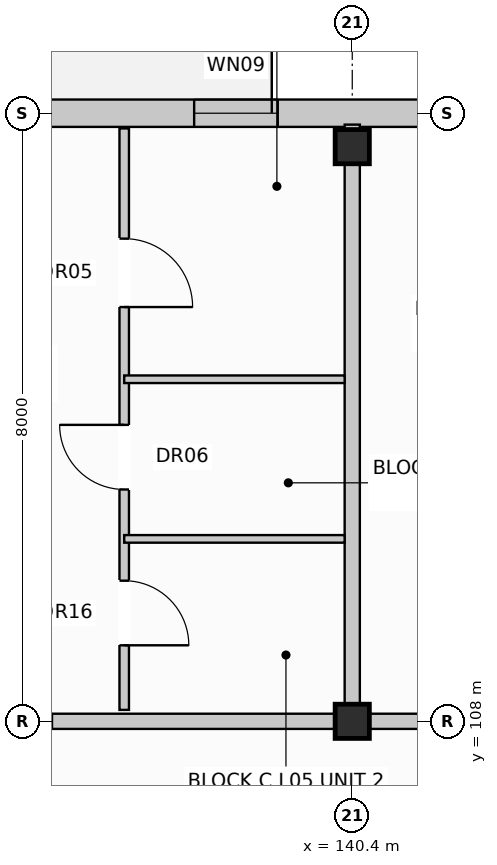
"""IFC4 building model, lengths in metres.
Left out: names, types, materials, properties, quantities, classifications, styles, units other than length and angle.
Written with IfcOpenShell. Run it as: python <this file> out.ifc"""

import sys

from ifc_helpers import new_model, si_unit, direction, frame, frame_2d, origin, origin_with_axes, origin_2d, place, context, subcontext, project, spatial, rectangle, extrude, element, fill, save


model = new_model("IFC4")
c1 = context("Model", 3, precision=1e-05, world=origin(), true_north=direction((0.0, 1.0)))
c2 = subcontext(c1, "Body", "Model", "MODEL_VIEW")
j1 = project(units=[si_unit("LENGTHUNIT", "METRE"), si_unit("PLANEANGLEUNIT", "RADIAN")], contexts=[c1])
p1 = place(None, origin())
s1 = spatial("IfcSite", under=j1, at=p1, CompositionType="ELEMENT")
p2 = place(p1, origin())
s2 = spatial("IfcBuilding", under=s1, at=p2, CompositionType="ELEMENT")
p3 = place(p2, frame((0.0, 0.0, 17.6)))
s3 = spatial("IfcBuildingStorey", under=s2, at=p3, CompositionType="ELEMENT", Elevation=17.6)
for number, where, z_axis, x_axis in (
    (1, (140.4, 108.0, 0.0), (0.0, 0.0, 1.0), (1.0, 0.0, 0.0)),
    (2, (140.4, 115.56, 0.0), (0.0, 0.0, 1.0), (1.0, 0.0, 0.0)),
):
    element("IfcColumn", number, at=place(p3, frame(where, z_axis=z_axis, x_axis=x_axis)), inside=s3, PredefinedType="COLUMN", context=c2, shape_type="SweptSolid", body=[
        extrude(rectangle(XDim=0.45, YDim=0.45, at=origin_2d()), origin(), (0.0, 0.0, 1.0), 3.2),
    ])
p4 = place(p3, frame((112.97, 116.0, 0.0), z_axis=(0.0, 0.0, 1.0), x_axis=(1.0, 0.0, 0.0)))
e3 = element("IfcWall", 3, at=p4, inside=s3, PredefinedType="STANDARD", context=c2, shape_type="SweptSolid", body=[
    extrude(rectangle(XDim=54.86, YDim=0.36, at=frame_2d((27.43, 0.0))), origin(), (0.0, 0.0, 1.0), 2.95),
])
p5 = place(p4, frame((4.891, 0.0, 0.0)))
e4 = element("IfcOpeningElement", 4, at=p5, cuts=e3, PredefinedType="OPENING", context=c2, shape_type="SweptSolid", body=[
    extrude(rectangle(XDim=0.95, YDim=2.1, at=frame_2d((0.475, 1.05))), frame((0.0, 0.192, 0.0), z_axis=(0.0, -1.0, 0.0), x_axis=(1.0, 0.0, 0.0)), (0.0, 0.0, 1.0), 0.384),
])
p6 = place(p4, frame((15.309, 0.0, 0.0)))
e5 = element("IfcOpeningElement", 5, at=p6, cuts=e3, PredefinedType="OPENING", context=c2, shape_type="SweptSolid", body=[
    extrude(rectangle(XDim=0.95, YDim=2.1, at=frame_2d((0.475, 1.05))), frame((0.0, 0.192, 0.0), z_axis=(0.0, -1.0, 0.0), x_axis=(1.0, 0.0, 0.0)), (0.0, 0.0, 1.0), 0.384),
])
p7 = place(p4, frame((31.409, 0.0, 0.0)))
e6 = element("IfcOpeningElement", 6, at=p7, cuts=e3, PredefinedType="OPENING", context=c2, shape_type="SweptSolid", body=[
    extrude(rectangle(XDim=0.95, YDim=2.1, at=frame_2d((0.475, 1.05))), frame((0.0, 0.192, 0.0), z_axis=(0.0, -1.0, 0.0), x_axis=(1.0, 0.0, 0.0)), (0.0, 0.0, 1.0), 0.384),
])
p8 = place(p4, frame((44.309, 0.0, 0.0)))
e7 = element("IfcOpeningElement", 7, at=p8, cuts=e3, PredefinedType="OPENING", context=c2, shape_type="SweptSolid", body=[
    extrude(rectangle(XDim=0.95, YDim=2.1, at=frame_2d((0.475, 1.05))), frame((0.0, 0.192, 0.0), z_axis=(0.0, -1.0, 0.0), x_axis=(1.0, 0.0, 0.0)), (0.0, 0.0, 1.0), 0.384),
])
p9 = place(p4, frame((2.025, 0.0, 0.8)))
e8 = element("IfcOpeningElement", 8, at=p9, cuts=e3, PredefinedType="OPENING", context=c2, shape_type="SweptSolid", body=[
    extrude(rectangle(XDim=1.95, YDim=1.65, at=frame_2d((0.975, 0.825))), frame((0.0, 0.192, 0.0), z_axis=(0.0, -1.0, 0.0), x_axis=(1.0, 0.0, 0.0)), (0.0, 0.0, 1.0), 0.384),
])
p10 = place(p4, frame((8.15, 0.0, 0.72)))
e9 = element("IfcOpeningElement", 9, at=p10, cuts=e3, PredefinedType="OPENING", context=c2, shape_type="SweptSolid", body=[
    extrude(rectangle(XDim=1.1, YDim=1.5, at=frame_2d((0.55, 0.75))), frame((0.0, 0.192, 0.0), z_axis=(0.0, -1.0, 0.0), x_axis=(1.0, 0.0, 0.0)), (0.0, 0.0, 1.0), 0.384),
])
p11 = place(p4, frame((11.675, 0.0, 0.85)))
e10 = element("IfcOpeningElement", 10, at=p11, cuts=e3, PredefinedType="OPENING", context=c2, shape_type="SweptSolid", body=[
    extrude(rectangle(XDim=1.35, YDim=1.6, at=frame_2d((0.675, 0.8))), frame((0.0, 0.192, 0.0), z_axis=(0.0, -1.0, 0.0), x_axis=(1.0, 0.0, 0.0)), (0.0, 0.0, 1.0), 0.384),
])
p12 = place(p4, frame((17.525, 0.0, 0.8)))
e11 = element("IfcOpeningElement", 11, at=p12, cuts=e3, PredefinedType="OPENING", context=c2, shape_type="SweptSolid", body=[
    extrude(rectangle(XDim=1.95, YDim=1.65, at=frame_2d((0.975, 0.825))), frame((0.0, 0.192, 0.0), z_axis=(0.0, -1.0, 0.0), x_axis=(1.0, 0.0, 0.0)), (0.0, 0.0, 1.0), 0.384),
])
p13 = place(p4, frame((21.6, 0.0, 0.8)))
e12 = element("IfcOpeningElement", 12, at=p13, cuts=e3, PredefinedType="OPENING", context=c2, shape_type="SweptSolid", body=[
    extrude(rectangle(XDim=1.8, YDim=1.7, at=frame_2d((0.9, 0.85))), frame((0.0, 0.192, 0.0), z_axis=(0.0, -1.0, 0.0), x_axis=(1.0, 0.0, 0.0)), (0.0, 0.0, 1.0), 0.384),
])
p14 = place(p4, frame((25.35, 0.0, 0.72)))
e13 = element("IfcOpeningElement", 13, at=p14, cuts=e3, PredefinedType="OPENING", context=c2, shape_type="SweptSolid", body=[
    extrude(rectangle(XDim=1.1, YDim=1.5, at=frame_2d((0.55, 0.75))), frame((0.0, 0.192, 0.0), z_axis=(0.0, -1.0, 0.0), x_axis=(1.0, 0.0, 0.0)), (0.0, 0.0, 1.0), 0.384),
])
p15 = place(p4, frame((29.125, 0.0, 0.8)))
e14 = element("IfcOpeningElement", 14, at=p15, cuts=e3, PredefinedType="OPENING", context=c2, shape_type="SweptSolid", body=[
    extrude(rectangle(XDim=1.95, YDim=1.65, at=frame_2d((0.975, 0.825))), frame((0.0, 0.192, 0.0), z_axis=(0.0, -1.0, 0.0), x_axis=(1.0, 0.0, 0.0)), (0.0, 0.0, 1.0), 0.384),
])
p16 = place(p4, frame((34.9, 0.0, 0.8)))
e15 = element("IfcOpeningElement", 15, at=p16, cuts=e3, PredefinedType="OPENING", context=c2, shape_type="SweptSolid", body=[
    extrude(rectangle(XDim=1.8, YDim=1.7, at=frame_2d((0.9, 0.85))), frame((0.0, 0.192, 0.0), z_axis=(0.0, -1.0, 0.0), x_axis=(1.0, 0.0, 0.0)), (0.0, 0.0, 1.0), 0.384),
])
p17 = place(p4, frame((38.45, 0.0, 0.72)))
e16 = element("IfcOpeningElement", 16, at=p17, cuts=e3, PredefinedType="OPENING", context=c2, shape_type="SweptSolid", body=[
    extrude(rectangle(XDim=1.1, YDim=1.5, at=frame_2d((0.55, 0.75))), frame((0.0, 0.192, 0.0), z_axis=(0.0, -1.0, 0.0), x_axis=(1.0, 0.0, 0.0)), (0.0, 0.0, 1.0), 0.384),
])
p18 = place(p4, frame((42.55, 0.0, 0.72)))
e17 = element("IfcOpeningElement", 17, at=p18, cuts=e3, PredefinedType="OPENING", context=c2, shape_type="SweptSolid", body=[
    extrude(rectangle(XDim=1.1, YDim=1.5, at=frame_2d((0.55, 0.75))), frame((0.0, 0.192, 0.0), z_axis=(0.0, -1.0, 0.0), x_axis=(1.0, 0.0, 0.0)), (0.0, 0.0, 1.0), 0.384),
])
p19 = place(p4, frame((45.8, 0.0, 0.8)))
e18 = element("IfcOpeningElement", 18, at=p19, cuts=e3, PredefinedType="OPENING", context=c2, shape_type="SweptSolid", body=[
    extrude(rectangle(XDim=1.8, YDim=1.7, at=frame_2d((0.9, 0.85))), frame((0.0, 0.192, 0.0), z_axis=(0.0, -1.0, 0.0), x_axis=(1.0, 0.0, 0.0)), (0.0, 0.0, 1.0), 0.384),
])
p20 = place(p4, frame((49.15, 0.0, 0.72)))
e19 = element("IfcOpeningElement", 19, at=p20, cuts=e3, PredefinedType="OPENING", context=c2, shape_type="SweptSolid", body=[
    extrude(rectangle(XDim=1.9, YDim=1.85, at=frame_2d((0.95, 0.925))), frame((0.0, 0.192, 0.0), z_axis=(0.0, -1.0, 0.0), x_axis=(1.0, 0.0, 0.0)), (0.0, 0.0, 1.0), 0.384),
])
p21 = place(p4, frame((52.95, 0.0, 0.72)))
e20 = element("IfcOpeningElement", 20, at=p21, cuts=e3, PredefinedType="OPENING", context=c2, shape_type="SweptSolid", body=[
    extrude(rectangle(XDim=1.1, YDim=1.5, at=frame_2d((0.55, 0.75))), frame((0.0, 0.192, 0.0), z_axis=(0.0, -1.0, 0.0), x_axis=(1.0, 0.0, 0.0)), (0.0, 0.0, 1.0), 0.384),
])
p22 = place(p3, frame((140.4, 108.15, 0.0), z_axis=(0.0, 0.0, 1.0), x_axis=(0.0, 1.0, 0.0)))
e21 = element("IfcWall", 21, at=p22, inside=s3, PredefinedType="PARTITIONING", context=c2, shape_type="SweptSolid", body=[
    extrude(rectangle(XDim=7.7, YDim=0.2, at=frame_2d((3.85, 0.0))), origin(), (0.0, 0.0, 1.0), 2.95),
])
p23 = place(p3, frame((133.5, 108.0, 0.0), z_axis=(0.0, 0.0, 1.0), x_axis=(1.0, 0.0, 0.0)))
e22 = element("IfcWall", 22, at=p23, inside=s3, PredefinedType="PARTITIONING", context=c2, shape_type="SweptSolid", body=[
    extrude(rectangle(XDim=6.9, YDim=0.2, at=frame_2d((3.45, 0.0))), origin(), (0.0, 0.0, 1.0), 2.39),
])
p24 = place(p23, frame((2.0, 0.0, 0.0)))
e23 = element("IfcOpeningElement", 23, at=p24, cuts=e22, PredefinedType="OPENING", context=c2, shape_type="SweptSolid", body=[
    extrude(rectangle(XDim=0.95, YDim=2.15, at=frame_2d((0.475, 1.075))), frame((0.0, 0.112, 0.0), z_axis=(0.0, -1.0, 0.0), x_axis=(1.0, 0.0, 0.0)), (0.0, 0.0, 1.0), 0.224),
])
p25 = place(p3, frame((137.4, 108.15, 0.0), z_axis=(0.0, 0.0, 1.0), x_axis=(0.0, 1.0, 0.0)))
e24 = element("IfcWall", 24, at=p25, inside=s3, PredefinedType="PARTITIONING", context=c2, shape_type="SweptSolid", body=[
    extrude(rectangle(XDim=7.65, YDim=0.125, at=frame_2d((3.825, 0.0))), origin(), (0.0, 0.0, 1.0), 2.95),
])
p26 = place(p25, frame((0.85, 0.0, 0.0)))
e25 = element("IfcOpeningElement", 25, at=p26, cuts=e24, PredefinedType="OPENING", context=c2, shape_type="SweptSolid", body=[
    extrude(rectangle(XDim=0.85, YDim=2.1, at=frame_2d((0.425, 1.05))), frame((0.0, 0.074, 0.0), z_axis=(0.0, -1.0, 0.0), x_axis=(1.0, 0.0, 0.0)), (0.0, 0.0, 1.0), 0.149),
])
p27 = place(p25, frame((2.9, 0.0, 0.0)))
e26 = element("IfcOpeningElement", 26, at=p27, cuts=e24, PredefinedType="OPENING", context=c2, shape_type="SweptSolid", body=[
    extrude(rectangle(XDim=0.85, YDim=2.05, at=frame_2d((0.425, 1.025))), frame((0.0, 0.074, 0.0), z_axis=(0.0, -1.0, 0.0), x_axis=(1.0, 0.0, 0.0)), (0.0, 0.0, 1.0), 0.149),
])
p28 = place(p25, frame((5.3, 0.0, 0.0)))
e27 = element("IfcOpeningElement", 27, at=p28, cuts=e24, PredefinedType="OPENING", context=c2, shape_type="SweptSolid", body=[
    extrude(rectangle(XDim=0.9, YDim=2.1, at=frame_2d((0.45, 1.05))), frame((0.0, 0.074, 0.0), z_axis=(0.0, -1.0, 0.0), x_axis=(1.0, 0.0, 0.0)), (0.0, 0.0, 1.0), 0.149),
])
for number, where, z_axis, x_axis in (
    (28, (137.4, 110.4, 0.0), (0.0, 0.0, 1.0), (1.0, 0.0, 0.0)),
    (29, (137.4, 112.5, 0.0), (0.0, 0.0, 1.0), (1.0, 0.0, 0.0)),
):
    element("IfcWall", number, at=place(p3, frame(where, z_axis=z_axis, x_axis=x_axis)), inside=s3, PredefinedType="PARTITIONING", context=c2, shape_type="SweptSolid", body=[
        extrude(rectangle(XDim=2.9, YDim=0.1, at=frame_2d((1.45, 0.0))), origin(), (0.0, 0.0, 1.0), 2.95),
    ])
p29 = place(p3, frame((140.4, 108.0, 0.0), z_axis=(0.0, 0.0, 1.0), x_axis=(1.0, 0.0, 0.0)))
e30 = element("IfcWall", 30, at=p29, inside=s3, PredefinedType="PARTITIONING", context=c2, shape_type="SweptSolid", body=[
    extrude(rectangle(XDim=13.8, YDim=0.2, at=frame_2d((6.9, 0.0))), origin(), (0.0, 0.0, 1.0), 2.39),
])
p30 = place(p29, frame((2.4, 0.0, 0.0)))
e31 = element("IfcOpeningElement", 31, at=p30, cuts=e30, PredefinedType="OPENING", context=c2, shape_type="SweptSolid", body=[
    extrude(rectangle(XDim=0.95, YDim=2.15, at=frame_2d((0.475, 1.075))), frame((0.0, 0.112, 0.0), z_axis=(0.0, -1.0, 0.0), x_axis=(1.0, 0.0, 0.0)), (0.0, 0.0, 1.0), 0.224),
])
p31 = place(p14, origin_with_axes())
e32 = element("IfcWindow", 32, at=p31, inside=s3, PartitioningType="SINGLE_PANEL", PredefinedType="WINDOW", context=c2, shape_type="SweptSolid", body=[
    extrude(rectangle(XDim=1.1, YDim=1.5, at=frame_2d((0.55, 0.75))), frame((0.0, 0.03, 0.0), z_axis=(0.0, -1.0, 0.0), x_axis=(1.0, 0.0, 0.0)), (0.0, 0.0, 1.0), 0.06),
])
fill(e13, e32)
p32 = place(p24, origin_with_axes())
e33 = element("IfcDoor", 33, at=p32, inside=s3, OperationType="SINGLE_SWING_LEFT", PredefinedType="DOOR", context=c2, shape_type="SweptSolid", body=[
    extrude(rectangle(XDim=0.95, YDim=2.15, at=frame_2d((0.475, 1.075))), frame((0.0, 0.025, 0.0), z_axis=(0.0, -1.0, 0.0), x_axis=(1.0, 0.0, 0.0)), (0.0, 0.0, 1.0), 0.05),
])
fill(e23, e33)
p33 = place(p26, frame((0.85, 0.0, 0.0), z_axis=(0.0, 0.0, 1.0), x_axis=(-1.0, 0.0, 0.0)))
e34 = element("IfcDoor", 34, at=p33, inside=s3, OperationType="SINGLE_SWING_LEFT", PredefinedType="DOOR", context=c2, shape_type="SweptSolid", body=[
    extrude(rectangle(XDim=0.85, YDim=2.1, at=frame_2d((0.425, 1.05))), frame((0.0, 0.025, 0.0), z_axis=(0.0, -1.0, 0.0), x_axis=(1.0, 0.0, 0.0)), (0.0, 0.0, 1.0), 0.05),
])
fill(e25, e34)
p34 = place(p27, origin_with_axes())
e35 = element("IfcDoor", 35, at=p34, inside=s3, OperationType="SINGLE_SWING_RIGHT", PredefinedType="DOOR", context=c2, shape_type="SweptSolid", body=[
    extrude(rectangle(XDim=0.85, YDim=2.05, at=frame_2d((0.425, 1.025))), frame((0.0, 0.025, 0.0), z_axis=(0.0, -1.0, 0.0), x_axis=(1.0, 0.0, 0.0)), (0.0, 0.0, 1.0), 0.05),
])
fill(e26, e35)
p35 = place(p28, frame((0.9, 0.0, 0.0), z_axis=(0.0, 0.0, 1.0), x_axis=(-1.0, 0.0, 0.0)))
e36 = element("IfcDoor", 36, at=p35, inside=s3, OperationType="SINGLE_SWING_LEFT", PredefinedType="DOOR", context=c2, shape_type="SweptSolid", body=[
    extrude(rectangle(XDim=0.9, YDim=2.1, at=frame_2d((0.45, 1.05))), frame((0.0, 0.025, 0.0), z_axis=(0.0, -1.0, 0.0), x_axis=(1.0, 0.0, 0.0)), (0.0, 0.0, 1.0), 0.05),
])
fill(e27, e36)
save(model, sys.argv[1])
